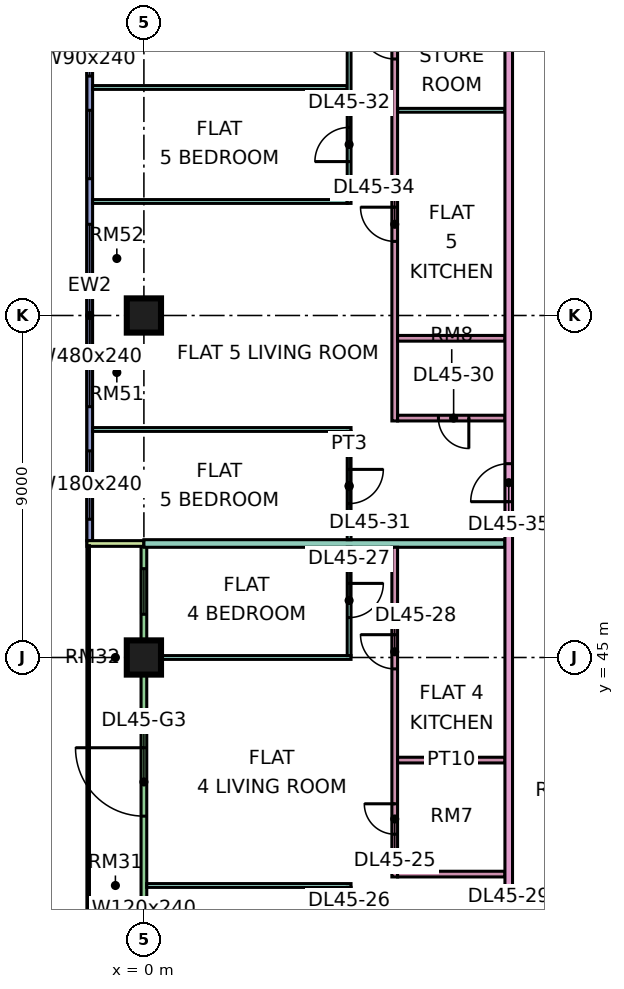
"""IFC4 building model, lengths in metres.
Left out: names, types, materials, properties, quantities, classifications, styles, units other than length and angle.
Written with IfcOpenShell. Run it as: python <this file> out.ifc"""

import sys

from ifc_helpers import new_model, si_unit, direction, frame, frame_2d, origin, origin_2d, place, context, subcontext, project, spatial, rectangle, extrude, element, fill, save


model = new_model("IFC4")
c1 = context("Model", 3, precision=1e-05, world=origin(), true_north=direction((0.0, 1.0)))
c2 = subcontext(c1, "Body", "Model", "MODEL_VIEW")
j1 = project(units=[si_unit("LENGTHUNIT", "METRE"), si_unit("PLANEANGLEUNIT", "RADIAN")], contexts=[c1])
p1 = place(None, origin())
s1 = spatial("IfcSite", under=j1, at=p1, CompositionType="ELEMENT")
p2 = place(p1, origin())
s2 = spatial("IfcBuilding", under=s1, at=p2, CompositionType="ELEMENT")
p3 = place(p2, frame((0.0, 0.0, 194.9)))
s3 = spatial("IfcBuildingStorey", under=s2, at=p3, CompositionType="ELEMENT", Elevation=194.9)
for number, where, z_axis, x_axis in (
    (1, (0.0, 45.0, 0.0), (0.0, 0.0, 1.0), (1.0, 0.0, 0.0)),
    (2, (0.0, 54.0, 0.0), (0.0, 0.0, 1.0), (1.0, 0.0, 0.0)),
):
    element("IfcColumn", number, at=place(p3, frame(where, z_axis=z_axis, x_axis=x_axis)), inside=s3, PredefinedType="COLUMN", context=c2, shape_type="SweptSolid", body=[
        extrude(rectangle(XDim=0.9, YDim=0.9, at=origin_2d()), origin(), (0.0, 0.0, 1.0), 3.75),
    ])
p4 = place(p3, frame((-1.425, 61.5, 0.0), z_axis=(0.0, 0.0, 1.0), x_axis=(0.0, -1.0, 0.0)))
e3 = element("IfcWall", 3, at=p4, inside=s3, PredefinedType="SOLIDWALL", context=c2, shape_type="SweptSolid", body=[
    extrude(rectangle(XDim=13.425, YDim=0.15, at=frame_2d((6.712, 0.0))), origin(), (0.0, 0.0, 1.0), 3.35),
])
p5 = place(p4, frame((0.3, 0.0, 0.45)))
e4 = element("IfcOpeningElement", 4, at=p5, cuts=e3, PredefinedType="OPENING", context=c2, shape_type="SweptSolid", body=[
    extrude(rectangle(XDim=0.9, YDim=2.4, at=frame_2d((0.45, 1.2))), frame((0.0, 0.085, 0.0), z_axis=(0.0, -1.0, 0.0), x_axis=(1.0, 0.0, 0.0)), (0.0, 0.0, 1.0), 0.17),
])
p6 = place(p4, frame((2.1, 0.0, 0.45)))
e5 = element("IfcOpeningElement", 5, at=p6, cuts=e3, PredefinedType="OPENING", context=c2, shape_type="SweptSolid", body=[
    extrude(rectangle(XDim=1.8, YDim=2.4, at=frame_2d((0.9, 1.2))), frame((0.0, 0.085, 0.0), z_axis=(0.0, -1.0, 0.0), x_axis=(1.0, 0.0, 0.0)), (0.0, 0.0, 1.0), 0.17),
])
p7 = place(p4, frame((5.1, 0.0, 0.45)))
e6 = element("IfcOpeningElement", 6, at=p7, cuts=e3, PredefinedType="OPENING", context=c2, shape_type="SweptSolid", body=[
    extrude(rectangle(XDim=4.8, YDim=2.4, at=frame_2d((2.4, 1.2))), frame((0.0, 0.085, 0.0), z_axis=(0.0, -1.0, 0.0), x_axis=(1.0, 0.0, 0.0)), (0.0, 0.0, 1.0), 0.17),
])
p8 = place(p4, frame((11.062, 0.0, 0.45)))
e7 = element("IfcOpeningElement", 7, at=p8, cuts=e3, PredefinedType="OPENING", context=c2, shape_type="SweptSolid", body=[
    extrude(rectangle(XDim=1.8, YDim=2.4, at=frame_2d((0.9, 1.2))), frame((0.0, 0.085, 0.0), z_axis=(0.0, -1.0, 0.0), x_axis=(1.0, 0.0, 0.0)), (0.0, 0.0, 1.0), 0.17),
])
p9 = place(p3, frame((0.0, 47.925, 0.0), z_axis=(0.0, 0.0, 1.0), x_axis=(0.0, -1.0, 0.0)))
e8 = element("IfcWall", 8, at=p9, inside=s3, PredefinedType="SOLIDWALL", context=c2, shape_type="SweptSolid", body=[
    extrude(rectangle(XDim=11.85, YDim=0.15, at=frame_2d((5.925, 0.0))), origin(), (0.0, 0.0, 1.0), 3.35),
])
p10 = place(p9, frame((0.587, 0.0, 0.45)))
e9 = element("IfcOpeningElement", 9, at=p10, cuts=e8, PredefinedType="OPENING", context=c2, shape_type="SweptSolid", body=[
    extrude(rectangle(XDim=1.2, YDim=2.4, at=frame_2d((0.6, 1.2))), frame((0.0, 0.085, 0.0), z_axis=(0.0, -1.0, 0.0), x_axis=(1.0, 0.0, 0.0)), (0.0, 0.0, 1.0), 0.17),
])
p11 = place(p9, frame((5.3, 0.0, 0.0)))
e10 = element("IfcOpeningElement", 10, at=p11, cuts=e8, PredefinedType="OPENING", context=c2, shape_type="SweptSolid", body=[
    extrude(rectangle(XDim=1.8, YDim=2.4, at=frame_2d((0.9, 1.2))), frame((0.0, 0.085, 0.0), z_axis=(0.0, -1.0, 0.0), x_axis=(1.0, 0.0, 0.0)), (0.0, 0.0, 1.0), 0.17),
])
p12 = place(p9, frame((9.55, 0.0, 0.45)))
e11 = element("IfcOpeningElement", 11, at=p12, cuts=e8, PredefinedType="OPENING", context=c2, shape_type="SweptSolid", body=[
    extrude(rectangle(XDim=1.2, YDim=2.4, at=frame_2d((0.6, 1.2))), frame((0.0, 0.085, 0.0), z_axis=(0.0, -1.0, 0.0), x_axis=(1.0, 0.0, 0.0)), (0.0, 0.0, 1.0), 0.17),
])
p13 = place(p3, frame((-1.5, 48.0, 0.0), z_axis=(0.0, 0.0, 1.0), x_axis=(1.0, 0.0, 0.0)))
e12 = element("IfcWall", 12, at=p13, inside=s3, PredefinedType="SOLIDWALL", context=c2, shape_type="SweptSolid", body=[
    extrude(rectangle(XDim=1.5, YDim=0.15, at=frame_2d((0.75, 0.0))), origin(), (0.0, 0.0, 1.0), 3.35),
])
p14 = place(p3, frame((-1.351, 60.0, 0.0), z_axis=(0.0, 0.0, 1.0), x_axis=(1.0, 0.0, 0.0)))
e13 = element("IfcWall", 13, at=p14, inside=s3, PredefinedType="PARTITIONING", context=c2, shape_type="SweptSolid", body=[
    extrude(rectangle(XDim=6.701, YDim=0.1, at=frame_2d((3.351, 0.0))), origin(), (0.0, 0.0, 1.0), 3.35),
])
p15 = place(p3, frame((0.0, 48.0, 0.0), z_axis=(0.0, 0.0, 1.0), x_axis=(1.0, 0.0, 0.0)))
e14 = element("IfcWall", 14, at=p15, inside=s3, PredefinedType="PARTITIONING", context=c2, shape_type="SweptSolid", body=[
    extrude(rectangle(XDim=9.5, YDim=0.2, at=frame_2d((4.75, 0.0))), origin(), (0.0, 0.0, 1.0), 3.35),
])
p16 = place(p3, frame((-1.35, 51.0, 0.0), z_axis=(0.0, 0.0, 1.0), x_axis=(1.0, 0.0, 0.0)))
e15 = element("IfcWall", 15, at=p16, inside=s3, PredefinedType="PARTITIONING", context=c2, shape_type="SweptSolid", body=[
    extrude(rectangle(XDim=6.8, YDim=0.1, at=frame_2d((3.4, 0.0))), origin(), (0.0, 0.0, 1.0), 3.35),
])
p17 = place(p3, frame((-1.35, 57.0, 0.0), z_axis=(0.0, 0.0, 1.0), x_axis=(1.0, 0.0, 0.0)))
e16 = element("IfcWall", 16, at=p17, inside=s3, PredefinedType="PARTITIONING", context=c2, shape_type="SweptSolid", body=[
    extrude(rectangle(XDim=6.7, YDim=0.1, at=frame_2d((3.35, 0.0))), origin(), (0.0, 0.0, 1.0), 3.35),
])
for number, where, z_axis, x_axis in (
    (17, (0.074, 39.0, 0.0), (0.0, 0.0, 1.0), (1.0, 0.0, 0.0)),
    (18, (0.074, 45.0, 0.0), (0.0, 0.0, 1.0), (1.0, 0.0, 0.0)),
):
    element("IfcWall", number, at=place(p3, frame(where, z_axis=z_axis, x_axis=x_axis)), inside=s3, PredefinedType="PARTITIONING", context=c2, shape_type="SweptSolid", body=[
        extrude(rectangle(XDim=5.376, YDim=0.1, at=frame_2d((2.688, 0.0))), origin(), (0.0, 0.0, 1.0), 3.35),
    ])
p18 = place(p3, frame((5.4, 36.1, 0.0), z_axis=(0.0, 0.0, 1.0), x_axis=(0.0, 1.0, 0.0)))
e19 = element("IfcWall", 19, at=p18, inside=s3, PredefinedType="PARTITIONING", context=c2, shape_type="SweptSolid", body=[
    extrude(rectangle(XDim=2.85, YDim=0.1, at=frame_2d((1.425, 0.0))), origin(), (0.0, 0.0, 1.0), 3.35),
])
p19 = place(p18, frame((0.95, 0.0, 0.0)))
e20 = element("IfcOpeningElement", 20, at=p19, cuts=e19, PredefinedType="OPENING", context=c2, shape_type="SweptSolid", body=[
    extrude(rectangle(XDim=0.9, YDim=2.1, at=frame_2d((0.45, 1.05))), frame((0.0, 0.06, 0.0), z_axis=(0.0, -1.0, 0.0), x_axis=(1.0, 0.0, 0.0)), (0.0, 0.0, 1.0), 0.12),
])
p20 = place(p3, frame((5.4, 45.05, 0.0), z_axis=(0.0, 0.0, 1.0), x_axis=(0.0, 1.0, 0.0)))
e21 = element("IfcWall", 21, at=p20, inside=s3, PredefinedType="PARTITIONING", context=c2, shape_type="SweptSolid", body=[
    extrude(rectangle(XDim=2.85, YDim=0.1, at=frame_2d((1.425, 0.0))), origin(), (0.0, 0.0, 1.0), 3.35),
])
p21 = place(p20, frame((1.0, 0.0, 0.0)))
e22 = element("IfcOpeningElement", 22, at=p21, cuts=e21, PredefinedType="OPENING", context=c2, shape_type="SweptSolid", body=[
    extrude(rectangle(XDim=0.9, YDim=2.1, at=frame_2d((0.45, 1.05))), frame((0.0, 0.06, 0.0), z_axis=(0.0, -1.0, 0.0), x_axis=(1.0, 0.0, 0.0)), (0.0, 0.0, 1.0), 0.12),
])
p22 = place(p3, frame((5.4, 48.1, 0.0), z_axis=(0.0, 0.0, 1.0), x_axis=(0.0, 1.0, 0.0)))
e23 = element("IfcWall", 23, at=p22, inside=s3, PredefinedType="PARTITIONING", context=c2, shape_type="SweptSolid", body=[
    extrude(rectangle(XDim=2.85, YDim=0.1, at=frame_2d((1.425, 0.0))), origin(), (0.0, 0.0, 1.0), 3.35),
])
p23 = place(p22, frame((0.95, 0.0, 0.0)))
e24 = element("IfcOpeningElement", 24, at=p23, cuts=e23, PredefinedType="OPENING", context=c2, shape_type="SweptSolid", body=[
    extrude(rectangle(XDim=0.9, YDim=2.1, at=frame_2d((0.45, 1.05))), frame((0.0, 0.06, 0.0), z_axis=(0.0, -1.0, 0.0), x_axis=(1.0, 0.0, 0.0)), (0.0, 0.0, 1.0), 0.12),
])
p24 = place(p3, frame((5.4, 56.95, 0.0), z_axis=(0.0, 0.0, 1.0), x_axis=(0.0, 1.0, 0.0)))
e25 = element("IfcWall", 25, at=p24, inside=s3, PredefinedType="PARTITIONING", context=c2, shape_type="SweptSolid", body=[
    extrude(rectangle(XDim=6.1, YDim=0.1, at=frame_2d((3.05, 0.0))), origin(), (0.0, 0.0, 1.0), 3.35),
])
p25 = place(p24, frame((1.1, 0.0, 0.0)))
e26 = element("IfcOpeningElement", 26, at=p25, cuts=e25, PredefinedType="OPENING", context=c2, shape_type="SweptSolid", body=[
    extrude(rectangle(XDim=0.9, YDim=2.1, at=frame_2d((0.45, 1.05))), frame((0.0, 0.06, 0.0), z_axis=(0.0, -1.0, 0.0), x_axis=(1.0, 0.0, 0.0)), (0.0, 0.0, 1.0), 0.12),
])
p26 = place(p24, frame((4.1, 0.0, 0.0)))
e27 = element("IfcOpeningElement", 27, at=p26, cuts=e25, PredefinedType="OPENING", context=c2, shape_type="SweptSolid", body=[
    extrude(rectangle(XDim=0.9, YDim=2.1, at=frame_2d((0.45, 1.05))), frame((0.0, 0.06, 0.0), z_axis=(0.0, -1.0, 0.0), x_axis=(1.0, 0.0, 0.0)), (0.0, 0.0, 1.0), 0.12),
])
p27 = place(p3, frame((6.6, 39.225, 0.0), z_axis=(0.0, 0.0, 1.0), x_axis=(0.0, 1.0, 0.0)))
e28 = element("IfcWall", 28, at=p27, inside=s3, PredefinedType="PARTITIONING", context=c2, shape_type="SweptSolid", body=[
    extrude(rectangle(XDim=8.675, YDim=0.15, at=frame_2d((4.337, 0.0))), origin(), (0.0, 0.0, 1.0), 3.35),
])
p28 = place(p27, frame((1.125, 0.0, 0.0)))
e29 = element("IfcOpeningElement", 29, at=p28, cuts=e28, PredefinedType="OPENING", context=c2, shape_type="SweptSolid", body=[
    extrude(rectangle(XDim=0.8, YDim=2.1, at=frame_2d((0.4, 1.05))), frame((0.0, 0.085, 0.0), z_axis=(0.0, -1.0, 0.0), x_axis=(1.0, 0.0, 0.0)), (0.0, 0.0, 1.0), 0.17),
])
p29 = place(p27, frame((5.475, 0.0, 0.0)))
e30 = element("IfcOpeningElement", 30, at=p29, cuts=e28, PredefinedType="OPENING", context=c2, shape_type="SweptSolid", body=[
    extrude(rectangle(XDim=0.9, YDim=2.1, at=frame_2d((0.45, 1.05))), frame((0.0, 0.085, 0.0), z_axis=(0.0, -1.0, 0.0), x_axis=(1.0, 0.0, 0.0)), (0.0, 0.0, 1.0), 0.17),
])
p30 = place(p3, frame((6.6, 51.225, 0.0), z_axis=(0.0, 0.0, 1.0), x_axis=(0.0, 1.0, 0.0)))
e31 = element("IfcWall", 31, at=p30, inside=s3, PredefinedType="PARTITIONING", context=c2, shape_type="SweptSolid", body=[
    extrude(rectangle(XDim=13.125, YDim=0.15, at=frame_2d((6.562, 0.0))), origin(), (0.0, 0.0, 1.0), 3.35),
])
p31 = place(p30, frame((4.725, 0.0, 0.0)))
e32 = element("IfcOpeningElement", 32, at=p31, cuts=e31, PredefinedType="OPENING", context=c2, shape_type="SweptSolid", body=[
    extrude(rectangle(XDim=0.9, YDim=2.1, at=frame_2d((0.45, 1.05))), frame((0.0, 0.085, 0.0), z_axis=(0.0, -1.0, 0.0), x_axis=(1.0, 0.0, 0.0)), (0.0, 0.0, 1.0), 0.17),
])
p32 = place(p30, frame((9.525, 0.0, 0.0)))
e33 = element("IfcOpeningElement", 33, at=p32, cuts=e31, PredefinedType="OPENING", context=c2, shape_type="SweptSolid", body=[
    extrude(rectangle(XDim=0.9, YDim=2.1, at=frame_2d((0.45, 1.05))), frame((0.0, 0.085, 0.0), z_axis=(0.0, -1.0, 0.0), x_axis=(1.0, 0.0, 0.0)), (0.0, 0.0, 1.0), 0.17),
])
for number, where, z_axis, x_axis in (
    (34, (6.675, 39.3, 0.0), (0.0, 0.0, 1.0), (1.0, 0.0, 0.0)),
    (35, (6.675, 42.3, 0.0), (0.0, 0.0, 1.0), (1.0, 0.0, 0.0)),
):
    element("IfcWall", number, at=place(p3, frame(where, z_axis=z_axis, x_axis=x_axis)), inside=s3, PredefinedType="PARTITIONING", context=c2, shape_type="SweptSolid", body=[
        extrude(rectangle(XDim=2.825, YDim=0.15, at=frame_2d((1.413, 0.0))), origin(), (0.0, 0.0, 1.0), 3.35),
    ])
p33 = place(p3, frame((6.675, 51.3, 0.0), z_axis=(0.0, 0.0, 1.0), x_axis=(1.0, 0.0, 0.0)))
e36 = element("IfcWall", 36, at=p33, inside=s3, PredefinedType="PARTITIONING", context=c2, shape_type="SweptSolid", body=[
    extrude(rectangle(XDim=2.825, YDim=0.15, at=frame_2d((1.413, 0.0))), origin(), (0.0, 0.0, 1.0), 3.35),
])
p34 = place(p33, frame((1.075, 0.0, 0.0)))
e37 = element("IfcOpeningElement", 37, at=p34, cuts=e36, PredefinedType="OPENING", context=c2, shape_type="SweptSolid", body=[
    extrude(rectangle(XDim=0.8, YDim=2.1, at=frame_2d((0.4, 1.05))), frame((0.0, 0.085, 0.0), z_axis=(0.0, -1.0, 0.0), x_axis=(1.0, 0.0, 0.0)), (0.0, 0.0, 1.0), 0.17),
])
p35 = place(p3, frame((6.675, 53.4, 0.0), z_axis=(0.0, 0.0, 1.0), x_axis=(1.0, 0.0, 0.0)))
e38 = element("IfcWall", 38, at=p35, inside=s3, PredefinedType="PARTITIONING", context=c2, shape_type="SweptSolid", body=[
    extrude(rectangle(XDim=2.825, YDim=0.15, at=frame_2d((1.413, 0.0))), origin(), (0.0, 0.0, 1.0), 3.35),
])
p36 = place(p3, frame((6.675, 59.4, 0.0), z_axis=(0.0, 0.0, 1.0), x_axis=(1.0, 0.0, 0.0)))
e39 = element("IfcWall", 39, at=p36, inside=s3, PredefinedType="PARTITIONING", context=c2, shape_type="SweptSolid", body=[
    extrude(rectangle(XDim=2.825, YDim=0.1, at=frame_2d((1.413, 0.0))), origin(), (0.0, 0.0, 1.0), 3.35),
])
p37 = place(p3, frame((9.6, 20.0, 0.0), z_axis=(0.0, 0.0, 1.0), x_axis=(0.0, 1.0, 0.0)))
e40 = element("IfcWall", 40, at=p37, inside=s3, PredefinedType="PARTITIONING", context=c2, shape_type="SweptSolid", body=[
    extrude(rectangle(XDim=44.35, YDim=0.2, at=frame_2d((22.175, 0.0))), origin(), (0.0, 0.0, 1.0), 3.35),
])
p38 = place(p37, frame((17.1, 0.0, 0.0)))
e41 = element("IfcOpeningElement", 41, at=p38, cuts=e40, PredefinedType="OPENING", context=c2, shape_type="SweptSolid", body=[
    extrude(rectangle(XDim=1.0, YDim=2.1, at=frame_2d((0.5, 1.05))), frame((0.0, 0.11, 0.0), z_axis=(0.0, -1.0, 0.0), x_axis=(1.0, 0.0, 0.0)), (0.0, 0.0, 1.0), 0.22),
])
p39 = place(p37, frame((29.1, 0.0, 0.0)))
e42 = element("IfcOpeningElement", 42, at=p39, cuts=e40, PredefinedType="OPENING", context=c2, shape_type="SweptSolid", body=[
    extrude(rectangle(XDim=1.0, YDim=2.1, at=frame_2d((0.5, 1.05))), frame((0.0, 0.11, 0.0), z_axis=(0.0, -1.0, 0.0), x_axis=(1.0, 0.0, 0.0)), (0.0, 0.0, 1.0), 0.22),
])
p40 = place(p37, frame((0.6, 0.0, 0.0)))
e43 = element("IfcOpeningElement", 43, at=p40, cuts=e40, PredefinedType="OPENING", context=c2, shape_type="SweptSolid", body=[
    extrude(rectangle(XDim=1.2, YDim=2.1, at=frame_2d((0.6, 1.05))), frame((0.0, 0.11, 0.0), z_axis=(0.0, -1.0, 0.0), x_axis=(1.0, 0.0, 0.0)), (0.0, 0.0, 1.0), 0.22),
])
p41 = place(p37, frame((4.35, 0.0, 0.0)))
e44 = element("IfcOpeningElement", 44, at=p41, cuts=e40, PredefinedType="OPENING", context=c2, shape_type="SweptSolid", body=[
    extrude(rectangle(XDim=1.0, YDim=2.1, at=frame_2d((0.5, 1.05))), frame((0.0, 0.11, 0.0), z_axis=(0.0, -1.0, 0.0), x_axis=(1.0, 0.0, 0.0)), (0.0, 0.0, 1.0), 0.22),
])
p42 = place(p5, origin())
e45 = element("IfcWindow", 45, at=p42, inside=s3, PartitioningType="SINGLE_PANEL", PredefinedType="WINDOW", context=c2, shape_type="SweptSolid", body=[
    extrude(rectangle(XDim=0.9, YDim=2.4, at=frame_2d((0.45, 1.2))), frame((0.0, 0.03, 0.0), z_axis=(0.0, -1.0, 0.0), x_axis=(1.0, 0.0, 0.0)), (0.0, 0.0, 1.0), 0.06),
])
fill(e4, e45)
p43 = place(p6, origin())
e46 = element("IfcWindow", 46, at=p43, inside=s3, PartitioningType="SINGLE_PANEL", PredefinedType="WINDOW", context=c2, shape_type="SweptSolid", body=[
    extrude(rectangle(XDim=1.8, YDim=2.4, at=frame_2d((0.9, 1.2))), frame((0.0, 0.03, 0.0), z_axis=(0.0, -1.0, 0.0), x_axis=(1.0, 0.0, 0.0)), (0.0, 0.0, 1.0), 0.06),
])
fill(e5, e46)
p44 = place(p7, origin())
e47 = element("IfcWindow", 47, at=p44, inside=s3, PartitioningType="SINGLE_PANEL", PredefinedType="WINDOW", context=c2, shape_type="SweptSolid", body=[
    extrude(rectangle(XDim=4.8, YDim=2.4, at=frame_2d((2.4, 1.2))), frame((0.0, 0.03, 0.0), z_axis=(0.0, -1.0, 0.0), x_axis=(1.0, 0.0, 0.0)), (0.0, 0.0, 1.0), 0.06),
])
fill(e6, e47)
p45 = place(p8, origin())
e48 = element("IfcWindow", 48, at=p45, inside=s3, PartitioningType="SINGLE_PANEL", PredefinedType="WINDOW", context=c2, shape_type="SweptSolid", body=[
    extrude(rectangle(XDim=1.8, YDim=2.4, at=frame_2d((0.9, 1.2))), frame((0.0, 0.03, 0.0), z_axis=(0.0, -1.0, 0.0), x_axis=(1.0, 0.0, 0.0)), (0.0, 0.0, 1.0), 0.06),
])
fill(e7, e48)
p46 = place(p10, origin())
e49 = element("IfcWindow", 49, at=p46, inside=s3, PartitioningType="SINGLE_PANEL", PredefinedType="WINDOW", context=c2, shape_type="SweptSolid", body=[
    extrude(rectangle(XDim=1.2, YDim=2.4, at=frame_2d((0.6, 1.2))), frame((0.0, 0.03, 0.0), z_axis=(0.0, -1.0, 0.0), x_axis=(1.0, 0.0, 0.0)), (0.0, 0.0, 1.0), 0.06),
])
fill(e9, e49)
p47 = place(p11, frame((1.8, 0.0, 0.0), z_axis=(0.0, 0.0, 1.0), x_axis=(-1.0, 0.0, 0.0)))
e50 = element("IfcDoor", 50, at=p47, inside=s3, OperationType="DOUBLE_DOOR_SINGLE_SWING", PredefinedType="DOOR", context=c2, shape_type="SweptSolid", body=[
    extrude(rectangle(XDim=1.8, YDim=2.4, at=frame_2d((0.9, 1.2))), frame((0.0, 0.025, 0.0), z_axis=(0.0, -1.0, 0.0), x_axis=(1.0, 0.0, 0.0)), (0.0, 0.0, 1.0), 0.05),
])
fill(e10, e50)
p48 = place(p28, frame((0.8, 0.0, 0.0), z_axis=(0.0, 0.0, 1.0), x_axis=(-1.0, 0.0, 0.0)))
e51 = element("IfcDoor", 51, at=p48, inside=s3, OperationType="SINGLE_SWING_RIGHT", PredefinedType="DOOR", context=c2, shape_type="SweptSolid", body=[
    extrude(rectangle(XDim=0.8, YDim=2.1, at=frame_2d((0.4, 1.05))), frame((0.0, 0.025, 0.0), z_axis=(0.0, -1.0, 0.0), x_axis=(1.0, 0.0, 0.0)), (0.0, 0.0, 1.0), 0.05),
])
fill(e29, e51)
p49 = place(p21, origin())
e52 = element("IfcDoor", 52, at=p49, inside=s3, OperationType="SINGLE_SWING_RIGHT", PredefinedType="DOOR", context=c2, shape_type="SweptSolid", body=[
    extrude(rectangle(XDim=0.9, YDim=2.1, at=frame_2d((0.45, 1.05))), frame((0.0, 0.025, 0.0), z_axis=(0.0, -1.0, 0.0), x_axis=(1.0, 0.0, 0.0)), (0.0, 0.0, 1.0), 0.05),
])
fill(e22, e52)
p50 = place(p29, frame((0.9, 0.0, 0.0), z_axis=(0.0, 0.0, 1.0), x_axis=(-1.0, 0.0, 0.0)))
e53 = element("IfcDoor", 53, at=p50, inside=s3, OperationType="SINGLE_SWING_RIGHT", PredefinedType="DOOR", context=c2, shape_type="SweptSolid", body=[
    extrude(rectangle(XDim=0.9, YDim=2.1, at=frame_2d((0.45, 1.05))), frame((0.0, 0.025, 0.0), z_axis=(0.0, -1.0, 0.0), x_axis=(1.0, 0.0, 0.0)), (0.0, 0.0, 1.0), 0.05),
])
fill(e30, e53)
p51 = place(p34, origin())
e54 = element("IfcDoor", 54, at=p51, inside=s3, OperationType="SINGLE_SWING_RIGHT", PredefinedType="DOOR", context=c2, shape_type="SweptSolid", body=[
    extrude(rectangle(XDim=0.8, YDim=2.1, at=frame_2d((0.4, 1.05))), frame((0.0, 0.025, 0.0), z_axis=(0.0, -1.0, 0.0), x_axis=(1.0, 0.0, 0.0)), (0.0, 0.0, 1.0), 0.05),
])
fill(e37, e54)
p52 = place(p23, origin())
e55 = element("IfcDoor", 55, at=p52, inside=s3, OperationType="SINGLE_SWING_RIGHT", PredefinedType="DOOR", context=c2, shape_type="SweptSolid", body=[
    extrude(rectangle(XDim=0.9, YDim=2.1, at=frame_2d((0.45, 1.05))), frame((0.0, 0.025, 0.0), z_axis=(0.0, -1.0, 0.0), x_axis=(1.0, 0.0, 0.0)), (0.0, 0.0, 1.0), 0.05),
])
fill(e24, e55)
p53 = place(p25, origin())
e56 = element("IfcDoor", 56, at=p53, inside=s3, OperationType="SINGLE_SWING_LEFT", PredefinedType="DOOR", context=c2, shape_type="SweptSolid", body=[
    extrude(rectangle(XDim=0.9, YDim=2.1, at=frame_2d((0.45, 1.05))), frame((0.0, 0.025, 0.0), z_axis=(0.0, -1.0, 0.0), x_axis=(1.0, 0.0, 0.0)), (0.0, 0.0, 1.0), 0.05),
])
fill(e26, e56)
p54 = place(p31, frame((0.9, 0.0, 0.0), z_axis=(0.0, 0.0, 1.0), x_axis=(-1.0, 0.0, 0.0)))
e57 = element("IfcDoor", 57, at=p54, inside=s3, OperationType="SINGLE_SWING_RIGHT", PredefinedType="DOOR", context=c2, shape_type="SweptSolid", body=[
    extrude(rectangle(XDim=0.9, YDim=2.1, at=frame_2d((0.45, 1.05))), frame((0.0, 0.025, 0.0), z_axis=(0.0, -1.0, 0.0), x_axis=(1.0, 0.0, 0.0)), (0.0, 0.0, 1.0), 0.05),
])
fill(e32, e57)
p55 = place(p39, origin())
e58 = element("IfcDoor", 58, at=p55, inside=s3, OperationType="SINGLE_SWING_LEFT", PredefinedType="DOOR", context=c2, shape_type="SweptSolid", body=[
    extrude(rectangle(XDim=1.0, YDim=2.1, at=frame_2d((0.5, 1.05))), frame((0.0, 0.025, 0.0), z_axis=(0.0, -1.0, 0.0), x_axis=(1.0, 0.0, 0.0)), (0.0, 0.0, 1.0), 0.05),
])
fill(e42, e58)
p56 = place(p32, frame((0.9, 0.0, 0.0), z_axis=(0.0, 0.0, 1.0), x_axis=(-1.0, 0.0, 0.0)))
e59 = element("IfcDoor", 59, at=p56, inside=s3, OperationType="SINGLE_SWING_RIGHT", PredefinedType="DOOR", context=c2, shape_type="SweptSolid", body=[
    extrude(rectangle(XDim=0.9, YDim=2.1, at=frame_2d((0.45, 1.05))), frame((0.0, 0.025, 0.0), z_axis=(0.0, -1.0, 0.0), x_axis=(1.0, 0.0, 0.0)), (0.0, 0.0, 1.0), 0.05),
])
fill(e33, e59)
save(model, sys.argv[1])
